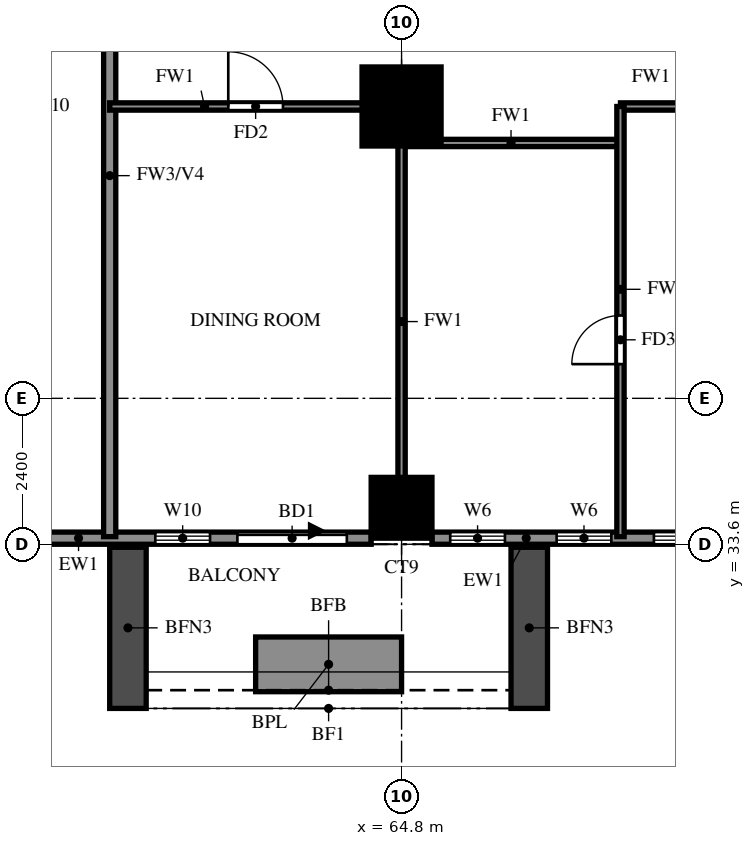
"""IFC4 building model, lengths in metres.
Left out: names, types, materials, properties, quantities, classifications, styles, units other than length and angle.
Written with IfcOpenShell. Run it as: python <this file> out.ifc"""

import sys

from ifc_helpers import new_model, si_unit, direction, frame, frame_2d, origin, origin_2d, place, context, subcontext, project, spatial, rectangle, extrude, source, transform, mapped, element, fill, save


model = new_model("IFC4")
c1 = context("Model", 3, precision=1e-05, world=origin(), true_north=direction((0.0, 1.0)))
c2 = subcontext(c1, "Body", "Model", "MODEL_VIEW")
j1 = project(units=[si_unit("LENGTHUNIT", "METRE"), si_unit("PLANEANGLEUNIT", "RADIAN")], contexts=[c1])
p1 = place(None, origin())
s1 = spatial("IfcSite", under=j1, at=p1, CompositionType="ELEMENT")
p2 = place(p1, origin())
s2 = spatial("IfcBuilding", under=s1, at=p2, CompositionType="ELEMENT")
p3 = place(p2, frame((0.0, 0.0, 79.5)))
s3 = spatial("IfcBuildingStorey", under=s2, at=p3, CompositionType="ELEMENT", Elevation=79.5)
m1 = source(origin(), c2, "Body", "SweptSolid", [
    extrude(rectangle(XDim=1.0, YDim=1.0, at=origin_2d()), origin(), (0.0, 0.0, 1.0), 3.18),
])
p4 = place(p3, frame((64.8, 34.2, 0.0), z_axis=(0.0, 0.0, 1.0), x_axis=(1.0, 0.0, 0.0)))
e1 = element("IfcColumn", 1, at=p4, inside=s3, PredefinedType="COLUMN", context=c2, shape_type="MappedRepresentation", body=[
    mapped(m1, transform((0.0, 0.0, 0.0))),
])
m2 = source(origin(), c2, "Body", "SweptSolid", [
    extrude(rectangle(XDim=1.3, YDim=1.3, at=origin_2d()), origin(), (0.0, 0.0, 1.0), 3.18),
])
p5 = place(p3, frame((64.8, 40.8, 0.0), z_axis=(0.0, 0.0, 1.0), x_axis=(1.0, 0.0, 0.0)))
e2 = element("IfcColumn", 2, at=p5, inside=s3, PredefinedType="COLUMN", context=c2, shape_type="MappedRepresentation", body=[
    mapped(m2, transform((0.0, 0.0, 0.0))),
])
p6 = place(p3, frame((58.8, 33.7, 0.0), z_axis=(0.0, 0.0, 1.0), x_axis=(1.0, 0.0, 0.0)))
e3 = element("IfcWall", 3, at=p6, inside=s3, PredefinedType="SOLIDWALL", context=c2, shape_type="SweptSolid", body=[
    extrude(rectangle(XDim=5.5, YDim=0.2, at=frame_2d((2.75, 0.0))), origin(), (0.0, 0.0, 1.0), 3.18),
])
p7 = place(p6, frame((3.3, 0.0, 0.0)))
e4 = element("IfcOpeningElement", 4, at=p7, cuts=e3, PredefinedType="OPENING", context=c2, shape_type="SweptSolid", body=[
    extrude(rectangle(XDim=1.8, YDim=2.4, at=frame_2d((0.9, 1.2))), frame((0.0, 0.11, 0.0), z_axis=(0.0, -1.0, 0.0), x_axis=(1.0, 0.0, 0.0)), (0.0, 0.0, 1.0), 0.22),
])
p8 = place(p6, frame((1.95, 0.0, 0.6)))
e5 = element("IfcOpeningElement", 5, at=p8, cuts=e3, PredefinedType="OPENING", context=c2, shape_type="SweptSolid", body=[
    extrude(rectangle(XDim=0.9, YDim=2.4, at=frame_2d((0.45, 1.2))), frame((0.0, 0.11, 0.0), z_axis=(0.0, -1.0, 0.0), x_axis=(1.0, 0.0, 0.0)), (0.0, 0.0, 1.0), 0.22),
])
p9 = place(p3, frame((65.3, 33.7, 0.0), z_axis=(0.0, 0.0, 1.0), x_axis=(1.0, 0.0, 0.0)))
e6 = element("IfcWall", 6, at=p9, inside=s3, PredefinedType="SOLIDWALL", context=c2, shape_type="SweptSolid", body=[
    extrude(rectangle(XDim=6.2, YDim=0.2, at=frame_2d((3.1, 0.0))), origin(), (0.0, 0.0, 1.0), 3.18),
])
p10 = place(p9, frame((3.65, 0.0, 0.6)))
e7 = element("IfcOpeningElement", 7, at=p10, cuts=e6, PredefinedType="OPENING", context=c2, shape_type="SweptSolid", body=[
    extrude(rectangle(XDim=1.8, YDim=2.4, at=frame_2d((0.9, 1.2))), frame((0.0, 0.11, 0.0), z_axis=(0.0, -1.0, 0.0), x_axis=(1.0, 0.0, 0.0)), (0.0, 0.0, 1.0), 0.22),
])
p11 = place(p9, frame((0.3, 0.0, 1.5)))
e8 = element("IfcOpeningElement", 8, at=p11, cuts=e6, PredefinedType="OPENING", context=c2, shape_type="SweptSolid", body=[
    extrude(rectangle(XDim=0.9, YDim=0.9, at=frame_2d((0.45, 0.45))), frame((0.0, 0.11, 0.0), z_axis=(0.0, -1.0, 0.0), x_axis=(1.0, 0.0, 0.0)), (0.0, 0.0, 1.0), 0.22),
])
p12 = place(p9, frame((2.05, 0.0, 1.5)))
e9 = element("IfcOpeningElement", 9, at=p12, cuts=e6, PredefinedType="OPENING", context=c2, shape_type="SweptSolid", body=[
    extrude(rectangle(XDim=0.9, YDim=0.9, at=frame_2d((0.45, 0.45))), frame((0.0, 0.11, 0.0), z_axis=(0.0, -1.0, 0.0), x_axis=(1.0, 0.0, 0.0)), (0.0, 0.0, 1.0), 0.22),
])
for number, where, z_axis, x_axis in (
    (10, (60.3, 33.55, 0.0), (0.0, 0.0, 1.0), (0.0, -1.0, 0.0)),
    (11, (66.9, 33.55, 0.0), (0.0, 0.0, 1.0), (0.0, -1.0, 0.0)),
):
    element("IfcWall", number, at=place(p3, frame(where, z_axis=z_axis, x_axis=x_axis)), inside=s3, PredefinedType="SOLIDWALL", context=c2, shape_type="SweptSolid", body=[
        extrude(rectangle(XDim=2.65, YDim=0.6, at=frame_2d((1.325, 0.0))), origin(), (0.0, 0.0, 1.0), 2.85),
    ])
p13 = place(p3, frame((62.4, 31.625, 0.0), z_axis=(0.0, 0.0, 1.0), x_axis=(1.0, 0.0, 0.0)))
e12 = element("IfcWall", 12, at=p13, inside=s3, PredefinedType="SOLIDWALL", context=c2, shape_type="SweptSolid", body=[
    extrude(rectangle(XDim=2.4, YDim=0.9, at=frame_2d((1.2, 0.0))), origin(), (0.0, 0.0, 1.0), 0.9),
])
p14 = place(p3, frame((60.0, 33.725, 0.0), z_axis=(0.0, 0.0, 1.0), x_axis=(0.0, 1.0, 0.0)))
e13 = element("IfcWall", 13, at=p14, inside=s3, PredefinedType="SOLIDWALL", context=c2, shape_type="SweptSolid", body=[
    extrude(rectangle(XDim=11.875, YDim=0.2, at=frame_2d((5.938, 0.0))), origin(), (0.0, 0.0, 1.0), 2.28),
])
p15 = place(p3, frame((64.8, 40.2, 0.0), z_axis=(0.0, 0.0, 1.0), x_axis=(1.0, 0.0, 0.0)))
e14 = element("IfcWall", 14, at=p15, inside=s3, PredefinedType="PARTITIONING", context=c2, shape_type="SweptSolid", body=[
    extrude(rectangle(XDim=3.6, YDim=0.12, at=frame_2d((1.8, 0.0))), origin(), (0.0, 0.0, 1.0), 3.18),
])
p16 = place(p3, frame((60.0, 40.8, 0.0), z_axis=(0.0, 0.0, 1.0), x_axis=(1.0, 0.0, 0.0)))
e15 = element("IfcWall", 15, at=p16, inside=s3, PredefinedType="PARTITIONING", context=c2, shape_type="SweptSolid", body=[
    extrude(rectangle(XDim=4.8, YDim=0.12, at=frame_2d((2.4, 0.0))), origin(), (0.0, 0.0, 1.0), 3.18),
])
p17 = place(p16, frame((1.95, 0.0, 0.0)))
e16 = element("IfcOpeningElement", 16, at=p17, cuts=e15, PredefinedType="OPENING", context=c2, shape_type="SweptSolid", body=[
    extrude(rectangle(XDim=0.9, YDim=2.1, at=frame_2d((0.45, 1.05))), frame((0.0, 0.07, 0.0), z_axis=(0.0, -1.0, 0.0), x_axis=(1.0, 0.0, 0.0)), (0.0, 0.0, 1.0), 0.14),
])
p18 = place(p3, frame((68.4, 40.8, 0.0), z_axis=(0.0, 0.0, 1.0), x_axis=(1.0, 0.0, 0.0)))
e17 = element("IfcWall", 17, at=p18, inside=s3, PredefinedType="PARTITIONING", context=c2, shape_type="SweptSolid", body=[
    extrude(rectangle(XDim=3.6, YDim=0.12, at=frame_2d((1.8, 0.0))), origin(), (0.0, 0.0, 1.0), 3.18),
])
p19 = place(p18, frame((1.35, 0.0, 0.0)))
e18 = element("IfcOpeningElement", 18, at=p19, cuts=e17, PredefinedType="OPENING", context=c2, shape_type="SweptSolid", body=[
    extrude(rectangle(XDim=0.9, YDim=2.1, at=frame_2d((0.45, 1.05))), frame((0.0, 0.07, 0.0), z_axis=(0.0, -1.0, 0.0), x_axis=(1.0, 0.0, 0.0)), (0.0, 0.0, 1.0), 0.14),
])
p20 = place(p3, frame((64.8, 33.725, 0.0), z_axis=(0.0, 0.0, 1.0), x_axis=(0.0, 1.0, 0.0)))
e19 = element("IfcWall", 19, at=p20, inside=s3, PredefinedType="PARTITIONING", context=c2, shape_type="SweptSolid", body=[
    extrude(rectangle(XDim=7.075, YDim=0.12, at=frame_2d((3.538, 0.0))), origin(), (0.0, 0.0, 1.0), 3.18),
])
p21 = place(p3, frame((68.4, 33.725, 0.0), z_axis=(0.0, 0.0, 1.0), x_axis=(0.0, 1.0, 0.0)))
e20 = element("IfcWall", 20, at=p21, inside=s3, PredefinedType="PARTITIONING", context=c2, shape_type="SweptSolid", body=[
    extrude(rectangle(XDim=7.075, YDim=0.12, at=frame_2d((3.538, 0.0))), origin(), (0.0, 0.0, 1.0), 2.28),
])
p22 = place(p21, frame((2.837, 0.0, 0.0)))
e21 = element("IfcOpeningElement", 21, at=p22, cuts=e20, PredefinedType="OPENING", context=c2, shape_type="SweptSolid", body=[
    extrude(rectangle(XDim=0.8, YDim=2.1, at=frame_2d((0.4, 1.05))), frame((0.0, 0.07, 0.0), z_axis=(0.0, -1.0, 0.0), x_axis=(1.0, 0.0, 0.0)), (0.0, 0.0, 1.0), 0.14),
])
p23 = place(p7, origin())
e22 = element("IfcDoor", 22, at=p23, inside=s3, OperationType="DOUBLE_DOOR_SLIDING", PredefinedType="DOOR", context=c2, shape_type="SweptSolid", body=[
    extrude(rectangle(XDim=1.8, YDim=2.4, at=frame_2d((0.9, 1.2))), frame((0.0, 0.025, 0.0), z_axis=(0.0, -1.0, 0.0), x_axis=(1.0, 0.0, 0.0)), (0.0, 0.0, 1.0), 0.05),
])
fill(e4, e22)
p24 = place(p8, origin())
e23 = element("IfcWindow", 23, at=p24, inside=s3, PartitioningType="SINGLE_PANEL", PredefinedType="WINDOW", context=c2, shape_type="SweptSolid", body=[
    extrude(rectangle(XDim=0.9, YDim=2.4, at=frame_2d((0.45, 1.2))), frame((0.0, 0.03, 0.0), z_axis=(0.0, -1.0, 0.0), x_axis=(1.0, 0.0, 0.0)), (0.0, 0.0, 1.0), 0.06),
])
fill(e5, e23)
p25 = place(p10, origin())
e24 = element("IfcWindow", 24, at=p25, inside=s3, PartitioningType="DOUBLE_PANEL_VERTICAL", PredefinedType="WINDOW", context=c2, shape_type="SweptSolid", body=[
    extrude(rectangle(XDim=1.8, YDim=2.4, at=frame_2d((0.9, 1.2))), frame((0.0, 0.03, 0.0), z_axis=(0.0, -1.0, 0.0), x_axis=(1.0, 0.0, 0.0)), (0.0, 0.0, 1.0), 0.06),
])
fill(e7, e24)
p26 = place(p11, origin())
e25 = element("IfcWindow", 25, at=p26, inside=s3, PartitioningType="SINGLE_PANEL", PredefinedType="WINDOW", context=c2, shape_type="SweptSolid", body=[
    extrude(rectangle(XDim=0.9, YDim=0.9, at=frame_2d((0.45, 0.45))), frame((0.0, 0.03, 0.0), z_axis=(0.0, -1.0, 0.0), x_axis=(1.0, 0.0, 0.0)), (0.0, 0.0, 1.0), 0.06),
])
fill(e8, e25)
p27 = place(p12, origin())
e26 = element("IfcWindow", 26, at=p27, inside=s3, PartitioningType="SINGLE_PANEL", PredefinedType="WINDOW", context=c2, shape_type="SweptSolid", body=[
    extrude(rectangle(XDim=0.9, YDim=0.9, at=frame_2d((0.45, 0.45))), frame((0.0, 0.03, 0.0), z_axis=(0.0, -1.0, 0.0), x_axis=(1.0, 0.0, 0.0)), (0.0, 0.0, 1.0), 0.06),
])
fill(e9, e26)
p28 = place(p22, origin())
e27 = element("IfcDoor", 27, at=p28, inside=s3, OperationType="SINGLE_SWING_LEFT", PredefinedType="DOOR", context=c2, shape_type="SweptSolid", body=[
    extrude(rectangle(XDim=0.8, YDim=2.1, at=frame_2d((0.4, 1.05))), frame((0.0, 0.025, 0.0), z_axis=(0.0, -1.0, 0.0), x_axis=(1.0, 0.0, 0.0)), (0.0, 0.0, 1.0), 0.05),
])
fill(e21, e27)
p29 = place(p17, origin())
e28 = element("IfcDoor", 28, at=p29, inside=s3, OperationType="SINGLE_SWING_RIGHT", PredefinedType="DOOR", context=c2, shape_type="SweptSolid", body=[
    extrude(rectangle(XDim=0.9, YDim=2.1, at=frame_2d((0.45, 1.05))), frame((0.0, 0.025, 0.0), z_axis=(0.0, -1.0, 0.0), x_axis=(1.0, 0.0, 0.0)), (0.0, 0.0, 1.0), 0.05),
])
fill(e16, e28)
save(model, sys.argv[1])
